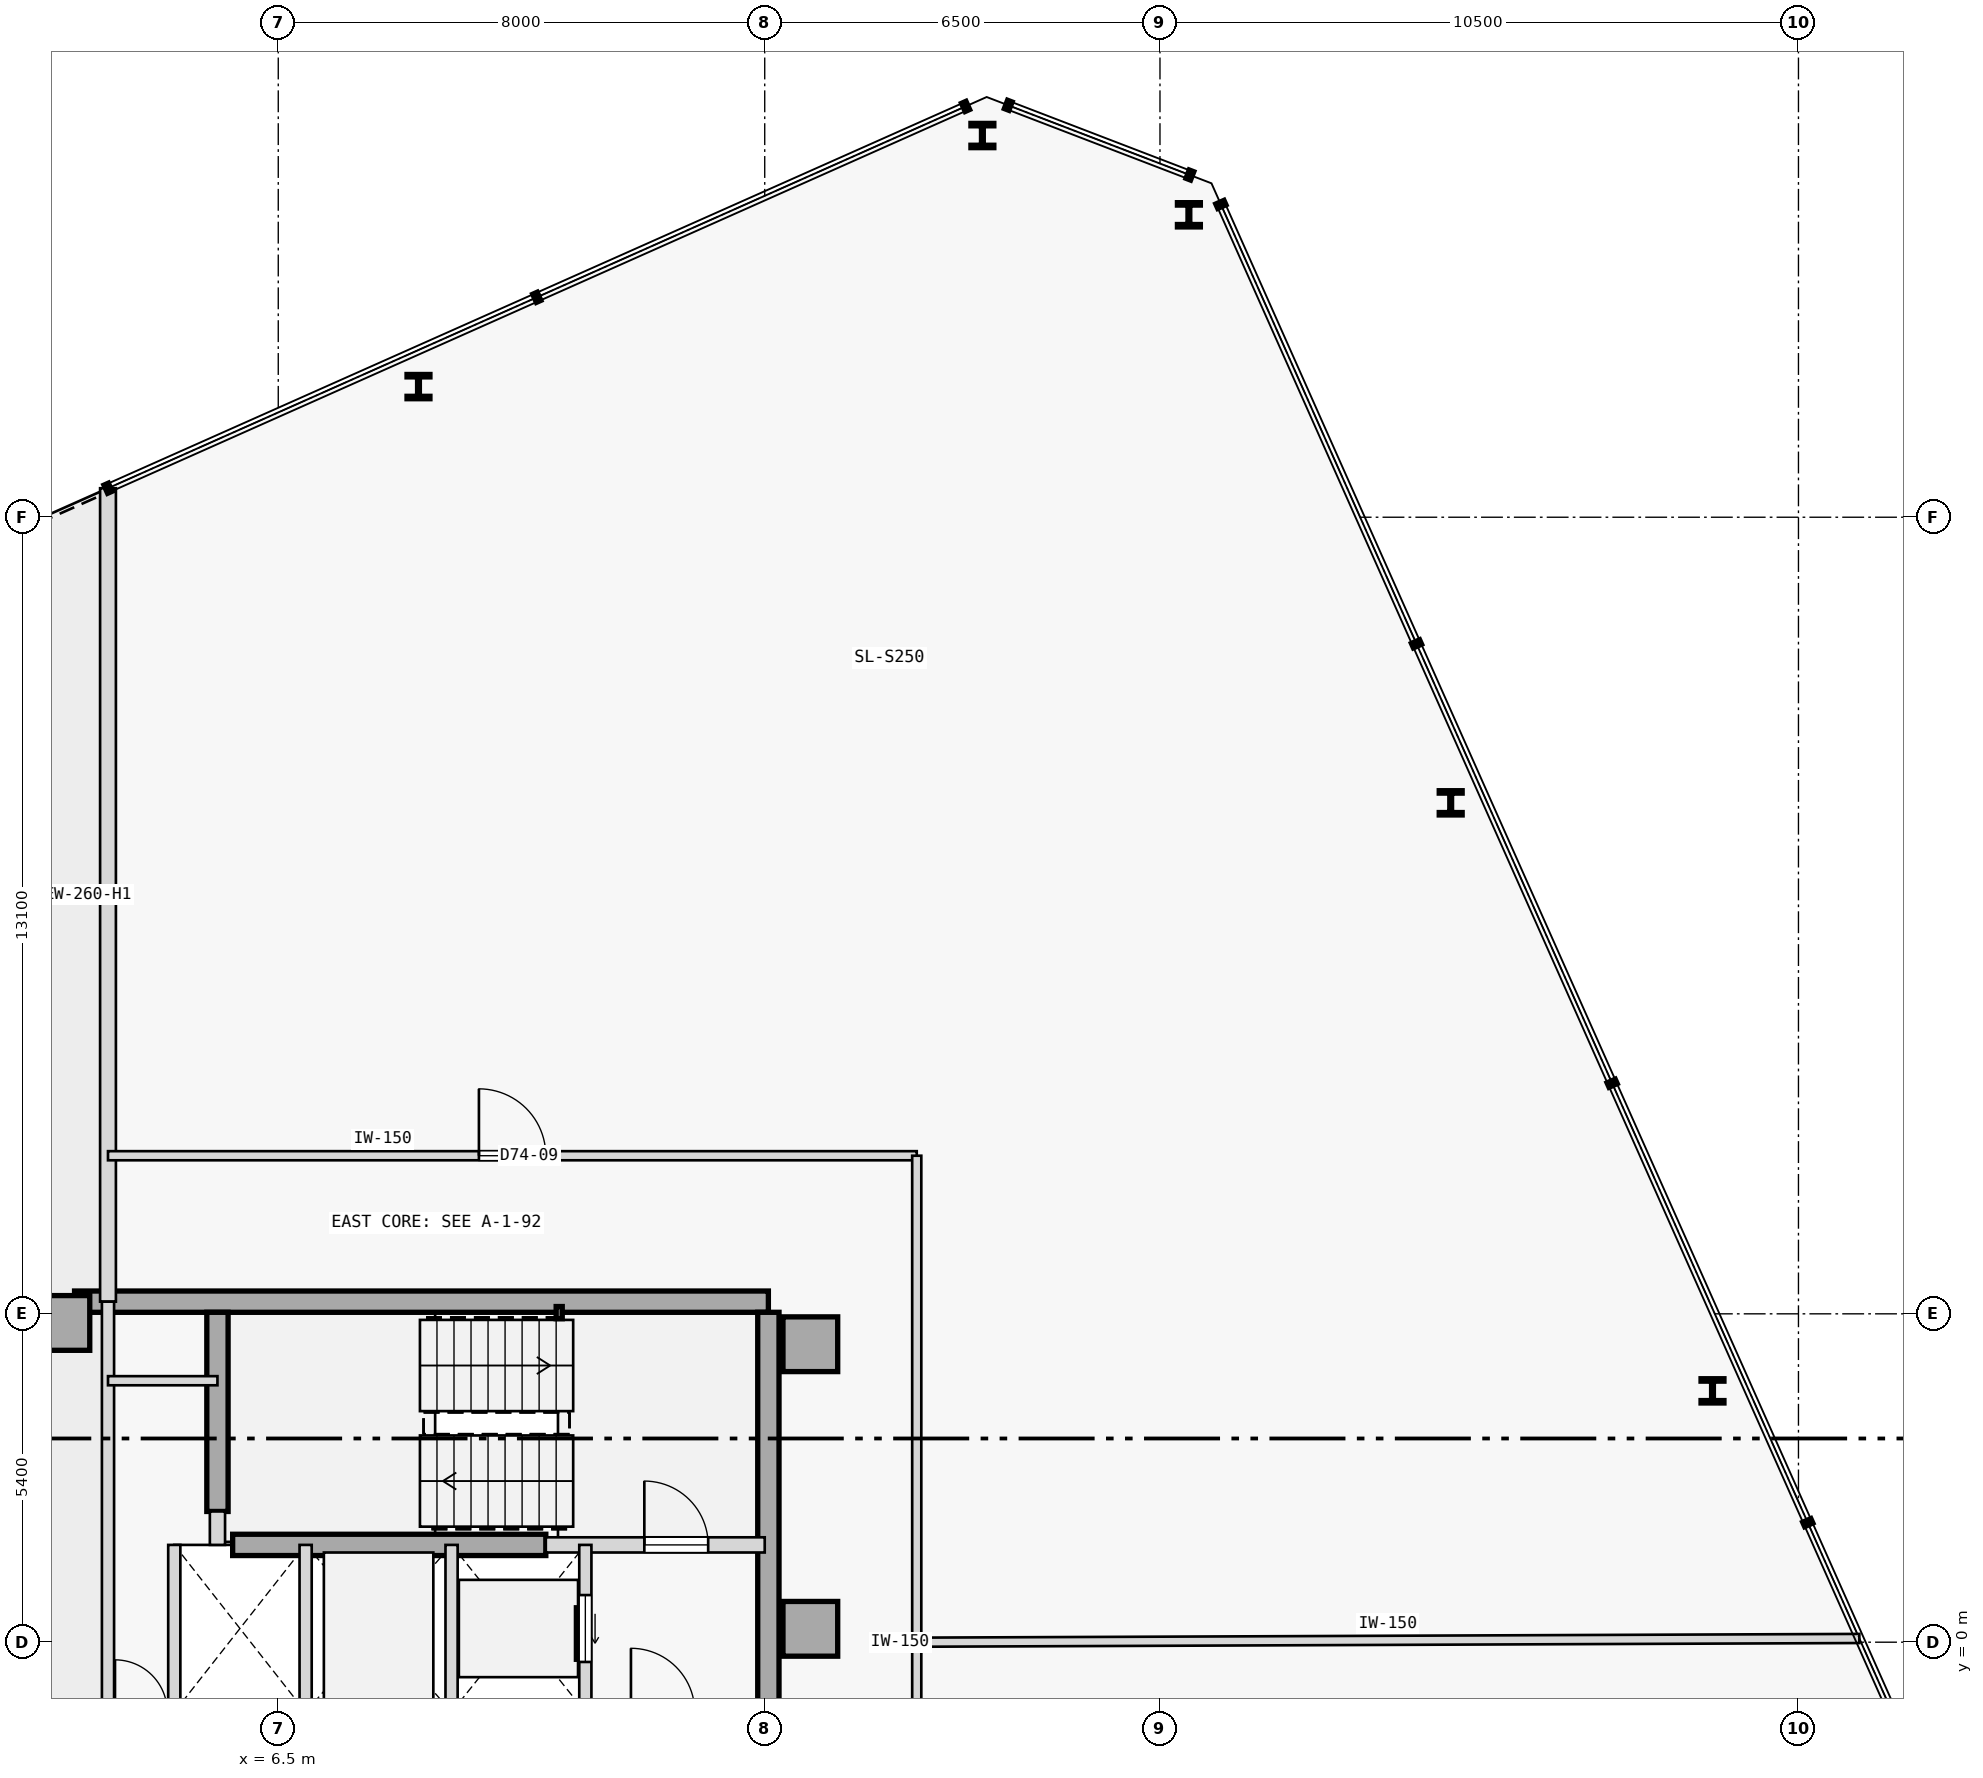
"""IFC4 building model, lengths in metres.
Left out: names, types, materials, properties, quantities, classifications, styles, units other than length and angle.
Written with IfcOpenShell. Run it as: python <this file> out.ifc"""

import sys

from ifc_helpers import new_model, si_unit, direction, frame, frame_2d, origin, origin_2d, place, context, subcontext, project, spatial, rectangle, hollow_rectangle, i_section, extrude, element, fill, save


model = new_model("IFC4")
c1 = context("Model", 3, precision=1e-05, world=origin(), true_north=direction((0.0, 1.0)))
c2 = subcontext(c1, "Body", "Model", "MODEL_VIEW")
j1 = project(units=[si_unit("LENGTHUNIT", "METRE"), si_unit("PLANEANGLEUNIT", "RADIAN")], contexts=[c1])
p1 = place(None, origin())
s1 = spatial("IfcSite", under=j1, at=p1, CompositionType="ELEMENT")
p2 = place(p1, origin())
s2 = spatial("IfcBuilding", under=s1, at=p2, CompositionType="ELEMENT")
p3 = place(p2, frame((0.0, 0.0, 275.6)))
s3 = spatial("IfcBuildingStorey", under=s2, at=p3, CompositionType="ELEMENT", Elevation=275.6)
for number, where, z_axis, x_axis in (
    (1, (15.25, 4.9, 0.0), (0.0, 0.0, 1.0), (1.0, 0.0, 0.0)),
    (2, (15.25, 0.22, 0.0), (0.0, 0.0, 1.0), (1.0, 0.0, 0.0)),
    (3, (2.95, 5.25, 0.0), (0.0, 0.0, 1.0), (1.0, 0.0, 0.0)),
):
    element("IfcColumn", number, at=place(p3, frame(where, z_axis=z_axis, x_axis=x_axis)), inside=s3, PredefinedType="COLUMN", context=c2, shape_type="SweptSolid", body=[
        extrude(rectangle(XDim=0.9, YDim=0.9, at=origin_2d()), origin(), (0.0, 0.0, 1.0), 6.3),
    ])
p4 = place(p3, frame((3.15, 5.6, 0.0), z_axis=(0.0, 0.0, 1.0), x_axis=(1.0, 0.0, 0.0)))
e4 = element("IfcWall", 4, at=p4, inside=s3, PredefinedType="SHEAR", context=c2, shape_type="SweptSolid", body=[
    extrude(rectangle(XDim=11.41, YDim=0.35, at=frame_2d((5.705, 0.0))), origin(), (0.0, 0.0, 1.0), 6.075),
])
p5 = place(p3, frame((14.56, -5.425, 0.0), z_axis=(0.0, 0.0, 1.0), x_axis=(0.0, 1.0, 0.0)))
e5 = element("IfcWall", 5, at=p5, inside=s3, PredefinedType="SHEAR", context=c2, shape_type="SweptSolid", body=[
    extrude(rectangle(XDim=10.85, YDim=0.35, at=frame_2d((5.425, 0.0))), origin(), (0.0, 0.0, 1.0), 6.075),
])
p6 = place(p5, frame((2.825, 0.0, 0.0)))
e6 = element("IfcOpeningElement", 6, at=p6, cuts=e5, PredefinedType="OPENING", context=c2, shape_type="SweptSolid", body=[
    extrude(rectangle(XDim=1.05, YDim=2.15, at=frame_2d((0.525, 1.075))), frame((0.0, 0.185, 0.0), z_axis=(0.0, -1.0, 0.0), x_axis=(1.0, 0.0, 0.0)), (0.0, 0.0, 1.0), 0.37),
])
p7 = place(p3, frame((5.5, 2.15, 0.0), z_axis=(0.0, 0.0, 1.0), x_axis=(0.0, 1.0, 0.0)))
e7 = element("IfcWall", 7, at=p7, inside=s3, PredefinedType="SHEAR", context=c2, shape_type="SweptSolid", body=[
    extrude(rectangle(XDim=3.275, YDim=0.35, at=frame_2d((1.638, 0.0))), origin(), (0.0, 0.0, 1.0), 6.075),
])
p8 = place(p3, frame((5.75, 1.6, 0.0), z_axis=(0.0, 0.0, 1.0), x_axis=(1.0, 0.0, 0.0)))
e8 = element("IfcWall", 8, at=p8, inside=s3, PredefinedType="SHEAR", context=c2, shape_type="SweptSolid", body=[
    extrude(rectangle(XDim=5.15, YDim=0.35, at=frame_2d((2.575, 0.0))), origin(), (0.0, 0.0, 1.0), 6.075),
])
p9 = place(p3, frame((11.12, 5.42, 0.0), z_axis=(0.0, 0.0, 1.0), x_axis=(1.0, 0.0, 0.0)))
e9 = element("IfcColumn", 9, at=p9, inside=s3, PredefinedType="COLUMN", context=c2, shape_type="SweptSolid", body=[
    extrude(hollow_rectangle(XDim=0.1, YDim=0.2, WallThickness=0.008, at=origin_2d()), origin(), (0.0, 0.0, 1.0), 6.3),
])
for number, where, z_axis, x_axis in (
    (10, (30.086, 4.133, 0.0), (0.0, 0.0, 1.0), (1.0, 0.0, 0.0)),
    (11, (25.781, 13.803, 0.0), (0.0, 0.0, 1.0), (1.0, 0.0, 0.0)),
    (12, (21.476, 23.473, 0.0), (0.0, 0.0, 1.0), (1.0, 0.0, 0.0)),
    (13, (18.08, 24.777, 0.0), (0.0, 0.0, 1.0), (1.0, 0.0, 0.0)),
    (14, (8.806, 20.648, 0.0), (0.0, 0.0, 1.0), (1.0, 0.0, 0.0)),
):
    element("IfcColumn", number, at=place(p3, frame(where, z_axis=z_axis, x_axis=x_axis)), inside=s3, PredefinedType="COLUMN", context=c2, shape_type="SweptSolid", body=[
        extrude(i_section(OverallWidth=0.377, OverallDepth=0.399, WebThickness=0.025, FlangeThickness=0.04, FilletRadius=0.015, at=origin_2d()), origin(), (0.0, 0.0, 1.0), 6.3),
    ])
p10 = place(p3, frame((3.7, 5.6, 0.0), z_axis=(0.0, 0.0, 1.0), x_axis=(0.0, 1.0, 0.0)))
e15 = element("IfcWall", 15, at=p10, inside=s3, PredefinedType="STANDARD", context=c2, shape_type="SweptSolid", body=[
    extrude(rectangle(XDim=13.377, YDim=0.26, at=frame_2d((6.688, 0.0))), origin(), (0.0, 0.0, 1.0), 5.625),
])
p11 = place(p3, frame((10.9, 1.6, 0.0), z_axis=(0.0, 0.0, 1.0), x_axis=(1.0, 0.0, 0.0)))
e16 = element("IfcWall", 16, at=p11, inside=s3, PredefinedType="STANDARD", context=c2, shape_type="SweptSolid", body=[
    extrude(rectangle(XDim=3.6, YDim=0.25, at=frame_2d((1.8, 0.0))), origin(), (0.0, 0.0, 1.0), 6.075),
])
p12 = place(p11, frame((1.62, 0.0, 0.0)))
e17 = element("IfcOpeningElement", 17, at=p12, cuts=e16, PredefinedType="OPENING", context=c2, shape_type="SweptSolid", body=[
    extrude(rectangle(XDim=1.05, YDim=2.15, at=frame_2d((0.525, 1.075))), frame((0.0, 0.135, 0.0), z_axis=(0.0, -1.0, 0.0), x_axis=(1.0, 0.0, 0.0)), (0.0, 0.0, 1.0), 0.27),
])
p13 = place(p3, frame((5.5, 1.6, 0.0), z_axis=(0.0, 0.0, 1.0), x_axis=(0.0, 1.0, 0.0)))
e18 = element("IfcWall", 18, at=p13, inside=s3, PredefinedType="STANDARD", context=c2, shape_type="SweptSolid", body=[
    extrude(rectangle(XDim=0.55, YDim=0.25, at=frame_2d((0.275, 0.0))), origin(), (0.0, 0.0, 1.0), 6.075),
])
p14 = place(p3, frame((3.7, -1.15, 0.0), z_axis=(0.0, 0.0, 1.0), x_axis=(0.0, 1.0, 0.0)))
e19 = element("IfcWall", 19, at=p14, inside=s3, PredefinedType="STANDARD", context=c2, shape_type="SweptSolid", body=[
    extrude(rectangle(XDim=6.75, YDim=0.2, at=frame_2d((3.375, 0.0))), origin(), (0.0, 0.0, 1.0), 6.075),
])
p15 = place(p3, frame((11.55, -1.15, 0.0), z_axis=(0.0, 0.0, 1.0), x_axis=(0.0, 1.0, 0.0)))
e20 = element("IfcWall", 20, at=p15, inside=s3, PredefinedType="STANDARD", context=c2, shape_type="SweptSolid", body=[
    extrude(rectangle(XDim=2.75, YDim=0.2, at=frame_2d((1.375, 0.0))), origin(), (0.0, 0.0, 1.0), 6.075),
])
p16 = place(p15, frame((0.825, 0.0, 0.0)))
e21 = element("IfcOpeningElement", 21, at=p16, cuts=e20, PredefinedType="OPENING", context=c2, shape_type="SweptSolid", body=[
    extrude(rectangle(XDim=1.1, YDim=2.15, at=frame_2d((0.55, 1.075))), frame((0.0, 0.11, 0.0), z_axis=(0.0, -1.0, 0.0), x_axis=(1.0, 0.0, 0.0)), (0.0, 0.0, 1.0), 0.22),
])
for number, where, z_axis, x_axis in (
    (22, (9.35, -1.15, 0.0), (0.0, 0.0, 1.0), (0.0, 1.0, 0.0)),
    (23, (6.95, -1.15, 0.0), (0.0, 0.0, 1.0), (0.0, 1.0, 0.0)),
    (24, (4.79, -1.15, 0.0), (0.0, 0.0, 1.0), (0.0, 1.0, 0.0)),
):
    element("IfcWall", number, at=place(p3, frame(where, z_axis=z_axis, x_axis=x_axis)), inside=s3, PredefinedType="STANDARD", context=c2, shape_type="SweptSolid", body=[
        extrude(rectangle(XDim=2.75, YDim=0.2, at=frame_2d((1.375, 0.0))), origin(), (0.0, 0.0, 1.0), 6.075),
    ])
p17 = place(p3, frame((3.7, 4.3, 0.0), z_axis=(0.0, 0.0, 1.0), x_axis=(1.0, 0.0, 0.0)))
e25 = element("IfcWall", 25, at=p17, inside=s3, PredefinedType="PARTITIONING", context=c2, shape_type="SweptSolid", body=[
    extrude(rectangle(XDim=1.8, YDim=0.15, at=frame_2d((0.9, 0.0))), origin(), (0.0, 0.0, 1.0), 6.075),
])
p18 = place(p3, frame((3.7, 8.0, 0.0), z_axis=(0.0, 0.0, 1.0), x_axis=(1.0, 0.0, 0.0)))
e26 = element("IfcWall", 26, at=p18, inside=s3, PredefinedType="PARTITIONING", context=c2, shape_type="SweptSolid", body=[
    extrude(rectangle(XDim=13.3, YDim=0.15, at=frame_2d((6.65, 0.0))), origin(), (0.0, 0.0, 1.0), 6.075),
])
p19 = place(p18, frame((6.1, 0.0, 0.0)))
e27 = element("IfcOpeningElement", 27, at=p19, cuts=e26, PredefinedType="OPENING", context=c2, shape_type="SweptSolid", body=[
    extrude(rectangle(XDim=1.1, YDim=2.15, at=frame_2d((0.55, 1.075))), frame((0.0, 0.085, 0.0), z_axis=(0.0, -1.0, 0.0), x_axis=(1.0, 0.0, 0.0)), (0.0, 0.0, 1.0), 0.17),
])
for number, where, z_axis, x_axis in (
    (28, (17.0, 0.0, 0.0), (0.0, 0.0, 1.0), (0.0, 1.0, 0.0)),
    (29, (17.0, -8.0, 0.0), (0.0, 0.0, 1.0), (0.0, 1.0, 0.0)),
):
    element("IfcWall", number, at=place(p3, frame(where, z_axis=z_axis, x_axis=x_axis)), inside=s3, PredefinedType="PARTITIONING", context=c2, shape_type="SweptSolid", body=[
        extrude(rectangle(XDim=8.0, YDim=0.15, at=frame_2d((4.0, 0.0))), origin(), (0.0, 0.0, 1.0), 6.075),
    ])
p20 = place(p3, frame((17.0, 0.0, 0.0), z_axis=(0.0, 0.0, 1.0), x_axis=(0.999992186475, 0.003953098542, 0.0)))
e30 = element("IfcWall", 30, at=p20, inside=s3, PredefinedType="PARTITIONING", context=c2, shape_type="SweptSolid", body=[
    extrude(rectangle(XDim=15.501, YDim=0.15, at=frame_2d((7.751, 0.0))), origin(), (0.0, 0.0, 1.0), 6.075),
])
p21 = place(p12, origin())
e31 = element("IfcDoor", 31, at=p21, inside=s3, OperationType="SINGLE_SWING_LEFT", PredefinedType="DOOR", context=c2, shape_type="SweptSolid", body=[
    extrude(rectangle(XDim=1.05, YDim=2.15, at=frame_2d((0.525, 1.075))), frame((0.0, 0.025, 0.0), z_axis=(0.0, -1.0, 0.0), x_axis=(1.0, 0.0, 0.0)), (0.0, 0.0, 1.0), 0.05),
])
fill(e17, e31)
p22 = place(p16, origin())
e32 = element("IfcDoor", 32, at=p22, inside=s3, OperationType="SLIDING_TO_RIGHT", PredefinedType="DOOR", context=c2, shape_type="SweptSolid", body=[
    extrude(rectangle(XDim=1.1, YDim=2.15, at=frame_2d((0.55, 1.075))), frame((0.0, 0.025, 0.0), z_axis=(0.0, -1.0, 0.0), x_axis=(1.0, 0.0, 0.0)), (0.0, 0.0, 1.0), 0.05),
])
fill(e21, e32)
p23 = place(p19, origin())
e33 = element("IfcDoor", 33, at=p23, inside=s3, OperationType="SINGLE_SWING_LEFT", PredefinedType="DOOR", context=c2, shape_type="SweptSolid", body=[
    extrude(rectangle(XDim=1.1, YDim=2.15, at=frame_2d((0.55, 1.075))), frame((0.0, 0.025, 0.0), z_axis=(0.0, -1.0, 0.0), x_axis=(1.0, 0.0, 0.0)), (0.0, 0.0, 1.0), 0.05),
])
fill(e27, e33)
save(model, sys.argv[1])
